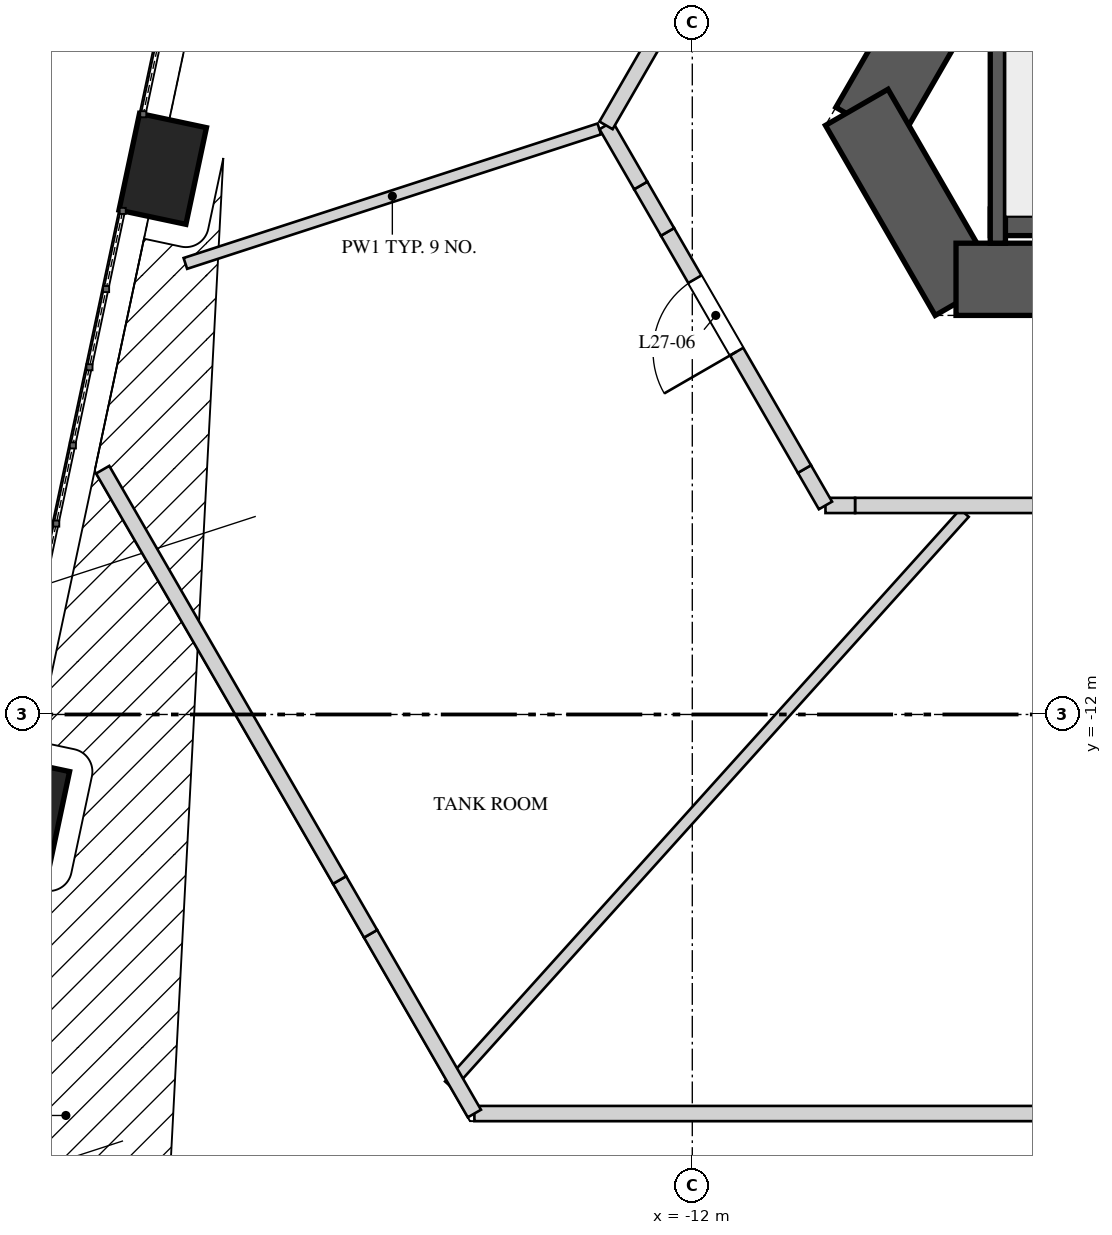
"""IFC4 building model, lengths in metres.
Left out: names, types, materials, properties, quantities, classifications, styles, units other than length and angle.
Written with IfcOpenShell. Run it as: python <this file> out.ifc"""

import sys

from ifc_helpers import new_model, si_unit, direction, frame, frame_2d, origin, origin_2d, place, context, subcontext, project, spatial, rectangle, extrude, element, fill, save


model = new_model("IFC4")
c1 = context("Model", 3, precision=1e-05, world=origin(), true_north=direction((0.0, 1.0)))
c2 = subcontext(c1, "Body", "Model", "MODEL_VIEW")
j1 = project(units=[si_unit("LENGTHUNIT", "METRE"), si_unit("PLANEANGLEUNIT", "RADIAN")], contexts=[c1])
p1 = place(None, origin())
s1 = spatial("IfcSite", under=j1, at=p1, CompositionType="ELEMENT")
p2 = place(p1, origin())
s2 = spatial("IfcBuilding", under=s1, at=p2, CompositionType="ELEMENT")
p3 = place(p2, frame((0.0, 0.0, 120.4)))
s3 = spatial("IfcBuildingStorey", under=s2, at=p3, CompositionType="ELEMENT", Elevation=120.4)
p4 = place(p3, frame((-1.169, 10.525, 0.0), z_axis=(0.0, 0.0, 1.0), x_axis=(-0.499999102847, -0.866025921755, 0.0)))
e1 = element("IfcWall", 1, at=p4, inside=s3, PredefinedType="SHEAR", context=c2, shape_type="SweptSolid", body=[
    extrude(rectangle(XDim=17.061, YDim=0.95, at=frame_2d((8.53, 0.0))), origin(), (0.0, 0.0, 1.0), 5.2),
])
p5 = place(p4, frame((6.735, 0.0, 0.0)))
e2 = element("IfcOpeningElement", 2, at=p5, cuts=e1, PredefinedType="OPENING", context=c2, shape_type="SweptSolid", body=[
    extrude(rectangle(XDim=1.0, YDim=2.4, at=frame_2d((0.5, 1.2))), frame((0.0, 0.485, 0.0), z_axis=(0.0, -1.0, 0.0), x_axis=(1.0, 0.0, 0.0)), (0.0, 0.0, 1.0), 0.97),
])
p6 = place(p3, frame((-9.837, -4.012, 0.0), z_axis=(0.0, 0.0, 1.0), x_axis=(0.499995765644, -0.866027848477, 0.0)))
e3 = element("IfcWall", 3, at=p6, inside=s3, PredefinedType="SHEAR", context=c2, shape_type="SweptSolid", body=[
    extrude(rectangle(XDim=2.887, YDim=0.95, at=frame_2d((1.443, 0.0))), origin(), (0.0, 0.0, 1.0), 5.2),
])
p7 = place(p3, frame((-8.531, -6.275, 0.0), z_axis=(0.0, 0.0, 1.0), x_axis=(1.0, 0.0, 0.0)))
e4 = element("IfcWall", 4, at=p7, inside=s3, PredefinedType="SHEAR", context=c2, shape_type="SweptSolid", body=[
    extrude(rectangle(XDim=17.061, YDim=0.95, at=frame_2d((8.531, 0.0))), origin(), (0.0, 0.0, 1.0), 5.2),
])
p8 = place(p7, frame((6.735, 0.0, 0.0)))
e5 = element("IfcOpeningElement", 5, at=p8, cuts=e4, PredefinedType="OPENING", context=c2, shape_type="SweptSolid", body=[
    extrude(rectangle(XDim=1.0, YDim=2.4, at=frame_2d((0.5, 1.2))), frame((0.0, 0.485, 0.0), z_axis=(0.0, -1.0, 0.0), x_axis=(1.0, 0.0, 0.0)), (0.0, 0.0, 1.0), 0.97),
])
p9 = place(p7, frame((14.613, 0.0, 0.0)))
e6 = element("IfcOpeningElement", 6, at=p9, cuts=e4, PredefinedType="OPENING", context=c2, shape_type="SweptSolid", body=[
    extrude(rectangle(XDim=0.8, YDim=2.1, at=frame_2d((0.4, 1.05))), frame((0.0, 0.485, 0.0), z_axis=(0.0, -1.0, 0.0), x_axis=(1.0, 0.0, 0.0)), (0.0, 0.0, 1.0), 0.97),
])
for number, where, z_axis, x_axis in (
    (7, (-18.967, -4.822, 0.0), (0.0, 0.0, 1.0), (-0.208, -0.978, 0.0)),
    (8, (-20.768, -13.293, 0.0), (0.0, 0.0, 1.0), (-0.208, -0.978, 0.0)),
):
    element("IfcColumn", number, at=place(p3, frame(where, z_axis=z_axis, x_axis=x_axis)), inside=s3, PredefinedType="COLUMN", context=c2, shape_type="SweptSolid", body=[
        extrude(rectangle(XDim=1.3, YDim=0.9, at=origin_2d()), origin(), (0.0, 0.0, 1.0), 2.864),
    ])
p10 = place(p3, frame((-8.08, -5.525, 0.0), z_axis=(0.0, 0.0, 1.0), x_axis=(1.0, 0.0, 0.0)))
e9 = element("IfcWall", 9, at=p10, inside=s3, PredefinedType="SOLIDWALL", context=c2, shape_type="SweptSolid", body=[
    extrude(rectangle(XDim=6.2, YDim=0.35, at=frame_2d((3.1, 0.0))), origin(), (0.0, 0.0, 1.0), 4.85),
])
p11 = place(p3, frame((-7.98, -2.9, 0.0), z_axis=(0.0, 0.0, 1.0), x_axis=(0.0, -1.0, 0.0)))
e10 = element("IfcWall", 10, at=p11, inside=s3, PredefinedType="SOLIDWALL", context=c2, shape_type="SweptSolid", body=[
    extrude(rectangle(XDim=2.9, YDim=0.2, at=frame_2d((1.45, 0.0))), origin(), (0.0, 0.0, 1.0), 4.85),
])
p12 = place(p3, frame((-13.223, -4.297, 0.0), z_axis=(0.0, 0.0, 1.0), x_axis=(-0.951064770515, -0.308991589345, 0.0)))
e11 = element("IfcWall", 11, at=p12, inside=s3, PredefinedType="PARTITIONING", context=c2, shape_type="SweptSolid", body=[
    extrude(rectangle(XDim=5.726, YDim=0.15, at=frame_2d((2.863, 0.0))), origin(), (0.0, 0.0, 1.0), 4.85),
])
p13 = place(p3, frame((-8.419, -9.35, 0.0), z_axis=(0.0, 0.0, 1.0), x_axis=(-0.669143140435, -0.743133539553, 0.0)))
e12 = element("IfcWall", 12, at=p13, inside=s3, PredefinedType="PARTITIONING", context=c2, shape_type="SweptSolid", body=[
    extrude(rectangle(XDim=10.13, YDim=0.15, at=frame_2d((5.065, 0.0))), origin(), (0.0, 0.0, 1.0), 4.85),
])
p14 = place(p3, frame((-3.385, -9.25, 0.0), z_axis=(0.0, 0.0, 1.0), x_axis=(-1.0, 0.0, 0.0)))
e13 = element("IfcWall", 13, at=p14, inside=s3, PredefinedType="SOLIDWALL", context=c2, shape_type="SweptSolid", body=[
    extrude(rectangle(XDim=6.474, YDim=0.2, at=frame_2d((3.237, 0.0))), origin(), (0.0, 0.0, 1.0), 4.85),
])
p15 = place(p3, frame((-9.859, -9.25, 0.0), z_axis=(0.0, 0.0, 1.0), x_axis=(-1.0, 0.0, 0.0)))
e14 = element("IfcWall", 14, at=p15, inside=s3, PredefinedType="SOLIDWALL", context=c2, shape_type="SweptSolid", body=[
    extrude(rectangle(XDim=0.389, YDim=0.2, at=frame_2d((0.195, 0.0))), origin(), (0.0, 0.0, 1.0), 3.95),
])
p16 = place(p3, frame((-10.248, -9.25, 0.0), z_axis=(0.0, 0.0, 1.0), x_axis=(-0.499887958344, 0.866090081402, 0.0)))
e15 = element("IfcWall", 15, at=p16, inside=s3, PredefinedType="SOLIDWALL", context=c2, shape_type="SweptSolid", body=[
    extrude(rectangle(XDim=0.553, YDim=0.2, at=frame_2d((0.277, 0.0))), origin(), (0.0, 0.0, 1.0), 3.95),
])
p17 = place(p3, frame((-10.525, -8.771, 0.0), z_axis=(0.0, 0.0, 1.0), x_axis=(-0.500031425827, 0.866007259314, 0.0)))
e16 = element("IfcWall", 16, at=p17, inside=s3, PredefinedType="SOLIDWALL", context=c2, shape_type="SweptSolid", body=[
    extrude(rectangle(XDim=3.602, YDim=0.2, at=frame_2d((1.801, 0.0))), origin(), (0.0, 0.0, 1.0), 4.85),
])
p18 = place(p17, frame((1.783, 0.0, 0.0)))
e17 = element("IfcOpeningElement", 17, at=p18, cuts=e16, PredefinedType="OPENING", context=c2, shape_type="SweptSolid", body=[
    extrude(rectangle(XDim=1.1, YDim=2.2, at=frame_2d((0.55, 1.1))), frame((0.0, 0.11, 0.0), z_axis=(0.0, -1.0, 0.0), x_axis=(1.0, 0.0, 0.0)), (0.0, 0.0, 1.0), 0.22),
])
p19 = place(p3, frame((-12.326, -5.651, 0.0), z_axis=(0.0, 0.0, 1.0), x_axis=(-0.499752435038, 0.86616828831, 0.0)))
e18 = element("IfcWall", 18, at=p19, inside=s3, PredefinedType="SOLIDWALL", context=c2, shape_type="SweptSolid", body=[
    extrude(rectangle(XDim=0.705, YDim=0.2, at=frame_2d((0.353, 0.0))), origin(), (0.0, 0.0, 1.0), 4.15),
])
p20 = place(p3, frame((-12.678, -5.041, 0.0), z_axis=(0.0, 0.0, 1.0), x_axis=(-0.500108273885, 0.865962882802, 0.0)))
e19 = element("IfcWall", 19, at=p20, inside=s3, PredefinedType="SOLIDWALL", context=c2, shape_type="SweptSolid", body=[
    extrude(rectangle(XDim=0.913, YDim=0.2, at=frame_2d((0.457, 0.0))), origin(), (0.0, 0.0, 1.0), 4.85),
])
p21 = place(p3, frame((-13.135, -4.25, 0.0), z_axis=(0.0, 0.0, 1.0), x_axis=(0.50000466804, 0.866022708674, 0.0)))
e20 = element("IfcWall", 20, at=p21, inside=s3, PredefinedType="SOLIDWALL", context=c2, shape_type="SweptSolid", body=[
    extrude(rectangle(XDim=5.142, YDim=0.2, at=frame_2d((2.571, 0.0))), origin(), (0.0, 0.0, 1.0), 4.85),
])
p22 = place(p21, frame((3.136, 0.0, 0.0)))
e21 = element("IfcOpeningElement", 21, at=p22, cuts=e20, PredefinedType="OPENING", context=c2, shape_type="SweptSolid", body=[
    extrude(rectangle(XDim=1.1, YDim=2.2, at=frame_2d((0.55, 1.1))), frame((0.0, 0.11, 0.0), z_axis=(0.0, -1.0, 0.0), x_axis=(1.0, 0.0, 0.0)), (0.0, 0.0, 1.0), 0.22),
])
p23 = place(p3, frame((-6.756, -17.25, 0.0), z_axis=(0.0, 0.0, 1.0), x_axis=(-1.0, 0.0, 0.0)))
e22 = element("IfcWall", 22, at=p23, inside=s3, PredefinedType="SOLIDWALL", context=c2, shape_type="SweptSolid", body=[
    extrude(rectangle(XDim=8.111, YDim=0.2, at=frame_2d((4.056, 0.0))), origin(), (0.0, 0.0, 1.0), 4.85),
])
p24 = place(p3, frame((-14.867, -17.25, 0.0), z_axis=(0.0, 0.0, 1.0), x_axis=(-0.500042275419, 0.866000994684, 0.0)))
e23 = element("IfcWall", 23, at=p24, inside=s3, PredefinedType="SOLIDWALL", context=c2, shape_type="SweptSolid", body=[
    extrude(rectangle(XDim=2.731, YDim=0.2, at=frame_2d((1.366, 0.0))), origin(), (0.0, 0.0, 1.0), 4.85),
])
p25 = place(p3, frame((-16.232, -14.885, 0.0), z_axis=(0.0, 0.0, 1.0), x_axis=(-0.499903734186, 0.866080975745, 0.0)))
e24 = element("IfcWall", 24, at=p25, inside=s3, PredefinedType="SOLIDWALL", context=c2, shape_type="SweptSolid", body=[
    extrude(rectangle(XDim=0.816, YDim=0.2, at=frame_2d((0.408, 0.0))), origin(), (0.0, 0.0, 1.0), 3.95),
])
p26 = place(p3, frame((-16.64, -14.178, 0.0), z_axis=(0.0, 0.0, 1.0), x_axis=(-0.499989156383, 0.866031664259, 0.0)))
e25 = element("IfcWall", 25, at=p26, inside=s3, PredefinedType="SOLIDWALL", context=c2, shape_type="SweptSolid", body=[
    extrude(rectangle(XDim=6.234, YDim=0.2, at=frame_2d((3.117, 0.0))), origin(), (0.0, 0.0, 1.0), 4.85),
])
p27 = place(p18, origin())
e26 = element("IfcDoor", 26, at=p27, inside=s3, OperationType="SINGLE_SWING_RIGHT", PredefinedType="DOOR", context=c2, shape_type="SweptSolid", body=[
    extrude(rectangle(XDim=1.1, YDim=2.2, at=frame_2d((0.55, 1.1))), frame((0.0, 0.025, 0.0), z_axis=(0.0, -1.0, 0.0), x_axis=(1.0, 0.0, 0.0)), (0.0, 0.0, 1.0), 0.05),
])
fill(e17, e26)
save(model, sys.argv[1])
